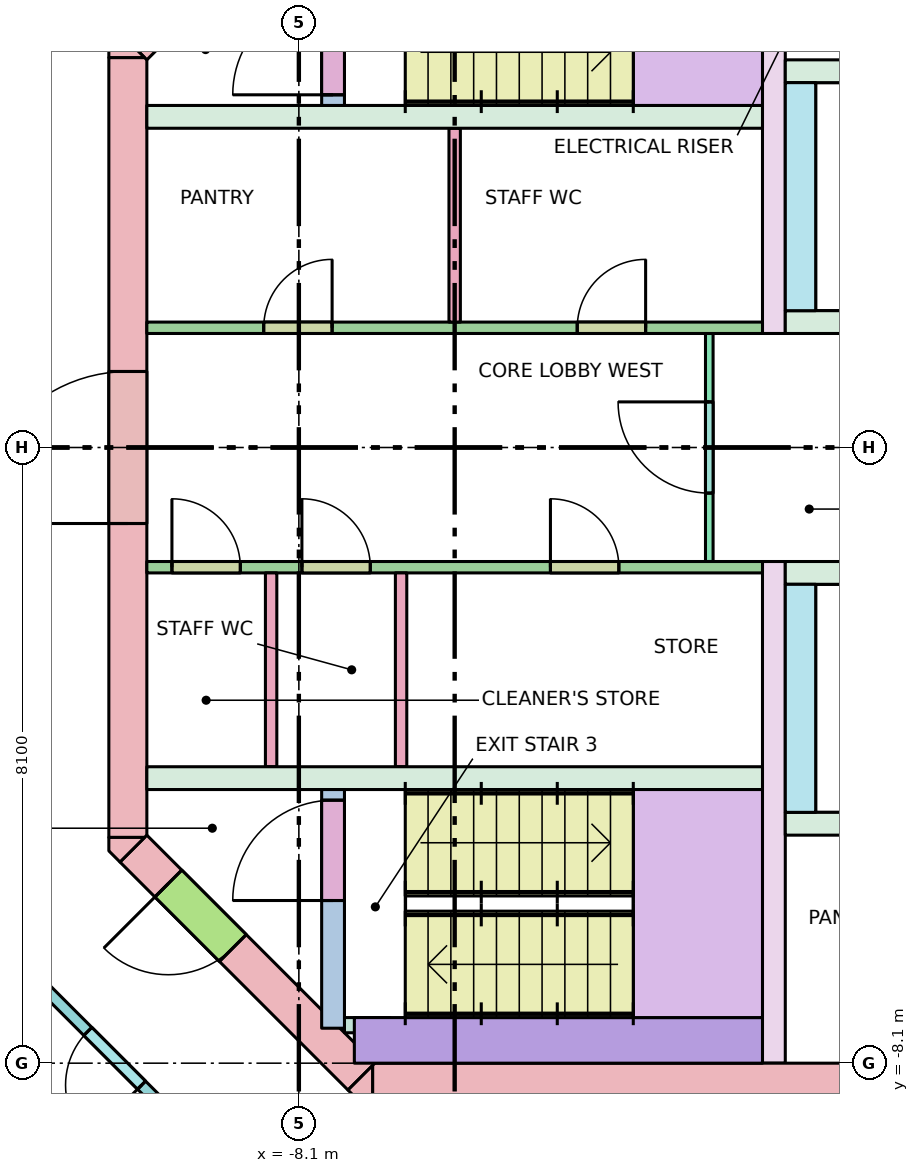
"""IFC4 building model, lengths in metres.
Left out: names, types, materials, properties, quantities, classifications, styles, units other than length and angle.
Written with IfcOpenShell. Run it as: python <this file> out.ifc"""

import sys

from ifc_helpers import new_model, si_unit, direction, frame, frame_2d, origin, place, context, subcontext, project, spatial, polyline, rectangle, outline, extrude, element, fill, save


model = new_model("IFC4")
c1 = context("Model", 3, precision=1e-05, world=origin(), true_north=direction((0.0, 1.0)))
c2 = subcontext(c1, "Body", "Model", "MODEL_VIEW")
j1 = project(units=[si_unit("LENGTHUNIT", "METRE"), si_unit("PLANEANGLEUNIT", "RADIAN")], contexts=[c1])
p1 = place(None, origin())
s1 = spatial("IfcSite", under=j1, at=p1, CompositionType="ELEMENT")
p2 = place(p1, origin())
s2 = spatial("IfcBuilding", under=s1, at=p2, CompositionType="ELEMENT")
p3 = place(p2, frame((0.0, 0.0, 287.1)))
s3 = spatial("IfcBuildingStorey", under=s2, at=p3, CompositionType="ELEMENT", Elevation=287.1)
p4 = place(p3, frame((-7.13, -8.35, -0.28), z_axis=(0.0, 0.0, 1.0), x_axis=(1.0, 0.0, 0.0)))
e1 = element("IfcWall", 1, at=p4, inside=s3, PredefinedType="SHEAR", context=c2, shape_type="SweptSolid", body=[
    extrude(rectangle(XDim=14.26, YDim=0.5, at=frame_2d((7.13, 0.0))), origin(), (0.0, 0.0, 1.0), 3.7),
])
p5 = place(p4, frame((8.08, 0.0, 0.28)))
e2 = element("IfcOpeningElement", 2, at=p5, cuts=e1, PredefinedType="OPENING", context=c2, shape_type="SweptSolid", body=[
    extrude(rectangle(XDim=0.7, YDim=2.1, at=frame_2d((0.35, 1.05))), frame((0.0, 0.26, 0.0), z_axis=(0.0, -1.0, 0.0), x_axis=(1.0, 0.0, 0.0)), (0.0, 0.0, 1.0), 0.52),
])
p6 = place(p4, frame((6.205, 0.0, 0.28)))
e3 = element("IfcOpeningElement", 3, at=p6, cuts=e1, PredefinedType="OPENING", context=c2, shape_type="SweptSolid", body=[
    extrude(rectangle(XDim=0.9, YDim=2.1, at=frame_2d((0.45, 1.05))), frame((0.0, 0.26, 0.0), z_axis=(0.0, -1.0, 0.0), x_axis=(1.0, 0.0, 0.0)), (0.0, 0.0, 1.0), 0.52),
])
p7 = place(p4, frame((10.667, 0.0, 0.28)))
e4 = element("IfcOpeningElement", 4, at=p7, cuts=e1, PredefinedType="OPENING", context=c2, shape_type="SweptSolid", body=[
    extrude(rectangle(XDim=0.9, YDim=2.1, at=frame_2d((0.45, 1.05))), frame((0.0, 0.26, 0.0), z_axis=(0.0, -1.0, 0.0), x_axis=(1.0, 0.0, 0.0)), (0.0, 0.0, 1.0), 0.52),
])
p8 = place(p3, frame((-10.35, -5.13, -0.28), z_axis=(0.0, 0.0, 1.0), x_axis=(0.0, 1.0, 0.0)))
e5 = element("IfcWall", 5, at=p8, inside=s3, PredefinedType="SHEAR", context=c2, shape_type="SweptSolid", body=[
    extrude(rectangle(XDim=10.26, YDim=0.5, at=frame_2d((5.13, 0.0))), origin(), (0.0, 0.0, 1.0), 3.7),
])
p9 = place(p8, frame((4.13, 0.0, 0.28)))
e6 = element("IfcOpeningElement", 6, at=p9, cuts=e5, PredefinedType="OPENING", context=c2, shape_type="SweptSolid", body=[
    extrude(rectangle(XDim=2.0, YDim=2.1, at=frame_2d((1.0, 1.05))), frame((0.0, 0.26, 0.0), z_axis=(0.0, -1.0, 0.0), x_axis=(1.0, 0.0, 0.0)), (0.0, 0.0, 1.0), 0.52),
])
p10 = place(p3, frame((-10.277, 5.277, -0.28), z_axis=(0.0, 0.0, 1.0), x_axis=(0.707106781187, 0.707106781187, 0.0)))
e7 = element("IfcWall", 7, at=p10, inside=s3, PredefinedType="SHEAR", context=c2, shape_type="SweptSolid", body=[
    extrude(rectangle(XDim=4.243, YDim=0.5, at=frame_2d((2.121, 0.0))), origin(), (0.0, 0.0, 1.0), 3.7),
])
p11 = place(p10, frame((0.65, 0.0, 0.28)))
e8 = element("IfcOpeningElement", 8, at=p11, cuts=e7, PredefinedType="OPENING", context=c2, shape_type="SweptSolid", body=[
    extrude(rectangle(XDim=1.2, YDim=2.1, at=frame_2d((0.6, 1.05))), frame((0.0, 0.26, 0.0), z_axis=(0.0, -1.0, 0.0), x_axis=(1.0, 0.0, 0.0)), (0.0, 0.0, 1.0), 0.52),
])
p12 = place(p3, frame((-7.277, -8.277, -0.28), z_axis=(0.0, 0.0, 1.0), x_axis=(-0.707106781187, 0.707106781187, 0.0)))
e9 = element("IfcWall", 9, at=p12, inside=s3, PredefinedType="SHEAR", context=c2, shape_type="SweptSolid", body=[
    extrude(rectangle(XDim=4.243, YDim=0.5, at=frame_2d((2.121, 0.0))), origin(), (0.0, 0.0, 1.0), 3.7),
])
p13 = place(p12, frame((2.393, 0.0, 0.28)))
e10 = element("IfcOpeningElement", 10, at=p13, cuts=e9, PredefinedType="OPENING", context=c2, shape_type="SweptSolid", body=[
    extrude(rectangle(XDim=1.2, YDim=2.1, at=frame_2d((0.6, 1.05))), frame((0.0, 0.26, 0.0), z_axis=(0.0, -1.0, 0.0), x_axis=(1.0, 0.0, 0.0)), (0.0, 0.0, 1.0), 0.52),
])
p14 = place(p3, frame((0.0, 0.0, -0.28)))
e11 = element("IfcWall", 11, at=p14, inside=s3, PredefinedType="SHEAR", context=c2, shape_type="SweptSolid", body=[
    extrude(outline(polyline([(-7.307, -8.6), (-7.454, -8.454), (-7.13, -8.13), (-7.13, -8.6), (-7.307, -8.6)])), origin(), (0.0, 0.0, 1.0), 3.7),
])
p15 = place(p3, frame((0.0, 0.0, -0.28)))
e12 = element("IfcWall", 12, at=p15, inside=s3, PredefinedType="SHEAR", context=c2, shape_type="SweptSolid", body=[
    extrude(outline(polyline([(-10.6, -5.307), (-10.6, -5.13), (-10.13, -5.13), (-10.454, -5.454), (-10.6, -5.307)])), origin(), (0.0, 0.0, 1.0), 3.7),
])
p16 = place(p3, frame((0.0, 0.0, -0.28)))
e13 = element("IfcWall", 13, at=p16, inside=s3, PredefinedType="SHEAR", context=c2, shape_type="SweptSolid", body=[
    extrude(outline(polyline([(-10.454, 5.454), (-10.13, 5.13), (-10.6, 5.13), (-10.6, 5.307), (-10.454, 5.454)])), origin(), (0.0, 0.0, 1.0), 3.7),
])
for number, where, z_axis, x_axis in (
    (14, (-10.1, 4.35, 0.0), (0.0, 0.0, 1.0), (1.0, 0.0, 0.0)),
    (15, (-10.1, -4.35, 0.0), (0.0, 0.0, 1.0), (1.0, 0.0, 0.0)),
):
    element("IfcWall", number, at=place(p3, frame(where, z_axis=z_axis, x_axis=x_axis)), inside=s3, PredefinedType="SOLIDWALL", context=c2, shape_type="SweptSolid", body=[
        extrude(rectangle(XDim=8.1, YDim=0.3, at=frame_2d((4.05, 0.0))), origin(), (0.0, 0.0, 1.0), 3.42),
    ])
for number, where, z_axis, x_axis in (
    (16, (-1.85, 1.5, 0.0), (0.0, 0.0, 1.0), (0.0, 1.0, 0.0)),
    (17, (-1.85, -8.1, 0.0), (0.0, 0.0, 1.0), (0.0, 1.0, 0.0)),
):
    element("IfcWall", number, at=place(p3, frame(where, z_axis=z_axis, x_axis=x_axis)), inside=s3, PredefinedType="SHEAR", context=c2, shape_type="SweptSolid", body=[
        extrude(rectangle(XDim=6.6, YDim=0.3, at=frame_2d((3.3, 0.0))), origin(), (0.0, 0.0, 1.0), 3.42),
    ])
p17 = place(p3, frame((-1.7, 1.65, 0.0), z_axis=(0.0, 0.0, 1.0), x_axis=(1.0, 0.0, 0.0)))
e18 = element("IfcWall", 18, at=p17, inside=s3, PredefinedType="SOLIDWALL", context=c2, shape_type="SweptSolid", body=[
    extrude(rectangle(XDim=3.4, YDim=0.3, at=frame_2d((1.7, 0.0))), origin(), (0.0, 0.0, 1.0), 3.42),
])
p18 = place(p17, frame((1.15, 0.0, 0.0)))
e19 = element("IfcOpeningElement", 19, at=p18, cuts=e18, PredefinedType="OPENING", context=c2, shape_type="SweptSolid", body=[
    extrude(rectangle(XDim=1.1, YDim=2.1, at=frame_2d((0.55, 1.05))), frame((0.0, 0.16, 0.0), z_axis=(0.0, -1.0, 0.0), x_axis=(1.0, 0.0, 0.0)), (0.0, 0.0, 1.0), 0.32),
])
p19 = place(p3, frame((-1.7, -1.65, 0.0), z_axis=(0.0, 0.0, 1.0), x_axis=(1.0, 0.0, 0.0)))
e20 = element("IfcWall", 20, at=p19, inside=s3, PredefinedType="SOLIDWALL", context=c2, shape_type="SweptSolid", body=[
    extrude(rectangle(XDim=3.4, YDim=0.3, at=frame_2d((1.7, 0.0))), origin(), (0.0, 0.0, 1.0), 3.42),
])
p20 = place(p19, frame((1.15, 0.0, 0.0)))
e21 = element("IfcOpeningElement", 21, at=p20, cuts=e20, PredefinedType="OPENING", context=c2, shape_type="SweptSolid", body=[
    extrude(rectangle(XDim=1.1, YDim=2.1, at=frame_2d((0.55, 1.05))), frame((0.0, 0.16, 0.0), z_axis=(0.0, -1.0, 0.0), x_axis=(1.0, 0.0, 0.0)), (0.0, 0.0, 1.0), 0.32),
])
for number, where, z_axis, x_axis in (
    (22, (-1.5, 1.8, 0.0), (0.0, 0.0, 1.0), (0.0, 1.0, 0.0)),
    (23, (-1.5, -4.8, 0.0), (0.0, 0.0, 1.0), (0.0, 1.0, 0.0)),
):
    element("IfcWall", number, at=place(p3, frame(where, z_axis=z_axis, x_axis=x_axis)), inside=s3, PredefinedType="SOLIDWALL", context=c2, shape_type="SweptSolid", body=[
        extrude(rectangle(XDim=3.0, YDim=0.4, at=frame_2d((1.5, 0.0))), origin(), (0.0, 0.0, 1.0), 3.42),
    ])
for number, where, z_axis, x_axis in (
    (24, (-1.7, 4.95, 0.0), (0.0, 0.0, 1.0), (1.0, 0.0, 0.0)),
    (25, (-1.7, -4.95, 0.0), (0.0, 0.0, 1.0), (1.0, 0.0, 0.0)),
):
    element("IfcWall", number, at=place(p3, frame(where, z_axis=z_axis, x_axis=x_axis)), inside=s3, PredefinedType="SOLIDWALL", context=c2, shape_type="SweptSolid", body=[
        extrude(rectangle(XDim=3.4, YDim=0.3, at=frame_2d((1.7, 0.0))), origin(), (0.0, 0.0, 1.0), 3.42),
    ])
p21 = place(p3, frame((-7.65, 4.5, 0.0), z_axis=(0.0, 0.0, 1.0), x_axis=(0.0, 1.0, 0.0)))
e26 = element("IfcWall", 26, at=p21, inside=s3, PredefinedType="SHEAR", context=c2, shape_type="SweptSolid", body=[
    extrude(rectangle(XDim=3.14, YDim=0.3, at=frame_2d((1.57, 0.0))), origin(), (0.0, 0.0, 1.0), 3.42),
])
p22 = place(p21, frame((0.14, 0.0, 0.0)))
e27 = element("IfcOpeningElement", 27, at=p22, cuts=e26, PredefinedType="OPENING", context=c2, shape_type="SweptSolid", body=[
    extrude(rectangle(XDim=1.32, YDim=2.1, at=frame_2d((0.66, 1.05))), frame((0.0, 0.16, 0.0), z_axis=(0.0, -1.0, 0.0), x_axis=(1.0, 0.0, 0.0)), (0.0, 0.0, 1.0), 0.32),
])
p23 = place(p3, frame((-7.65, -7.64, 0.0), z_axis=(0.0, 0.0, 1.0), x_axis=(0.0, 1.0, 0.0)))
e28 = element("IfcWall", 28, at=p23, inside=s3, PredefinedType="SHEAR", context=c2, shape_type="SweptSolid", body=[
    extrude(rectangle(XDim=3.14, YDim=0.3, at=frame_2d((1.57, 0.0))), origin(), (0.0, 0.0, 1.0), 3.42),
])
p24 = place(p23, frame((1.68, 0.0, 0.0)))
e29 = element("IfcOpeningElement", 29, at=p24, cuts=e28, PredefinedType="OPENING", context=c2, shape_type="SweptSolid", body=[
    extrude(rectangle(XDim=1.32, YDim=2.1, at=frame_2d((0.66, 1.05))), frame((0.0, 0.16, 0.0), z_axis=(0.0, -1.0, 0.0), x_axis=(1.0, 0.0, 0.0)), (0.0, 0.0, 1.0), 0.32),
])
p25 = place(p3, frame((-7.5, -7.6, 0.0), z_axis=(0.0, 0.0, 1.0), x_axis=(1.0, 0.0, 0.0)))
e30 = element("IfcWall", 30, at=p25, inside=s3, PredefinedType="SHEAR", context=c2, shape_type="SweptSolid", body=[
    extrude(rectangle(XDim=0.6, YDim=0.2, at=frame_2d((0.3, 0.0))), origin(), (0.0, 0.0, 1.0), 3.42),
])
p26 = place(p3, frame((-7.37, -7.8, 0.0), z_axis=(0.0, 0.0, 1.0), x_axis=(1.0, 0.0, 0.0)))
e31 = element("IfcWall", 31, at=p26, inside=s3, PredefinedType="SHEAR", context=c2, shape_type="SweptSolid", body=[
    extrude(rectangle(XDim=5.37, YDim=0.6, at=frame_2d((2.685, 0.0))), origin(), (0.0, 0.0, 1.0), 3.42),
])
p27 = place(p3, frame((-2.7, -1.5, 0.0), z_axis=(0.0, 0.0, 1.0), x_axis=(0.0, 1.0, 0.0)))
e32 = element("IfcWall", 32, at=p27, inside=s3, PredefinedType="PARTITIONING", context=c2, shape_type="SweptSolid", body=[
    extrude(rectangle(XDim=3.0, YDim=0.1, at=frame_2d((1.5, 0.0))), origin(), (0.0, 0.0, 1.0), 3.42),
])
p28 = place(p27, frame((0.9, 0.0, 0.0)))
e33 = element("IfcOpeningElement", 33, at=p28, cuts=e32, PredefinedType="OPENING", context=c2, shape_type="SweptSolid", body=[
    extrude(rectangle(XDim=1.2, YDim=2.1, at=frame_2d((0.6, 1.05))), frame((0.0, 0.06, 0.0), z_axis=(0.0, -1.0, 0.0), x_axis=(1.0, 0.0, 0.0)), (0.0, 0.0, 1.0), 0.12),
])
for number, where, z_axis, x_axis in (
    (34, (-6.05, 1.65, 0.0), (0.0, 0.0, 1.0), (0.0, 1.0, 0.0)),
    (35, (-8.465, -4.2, 0.0), (0.0, 0.0, 1.0), (0.0, 1.0, 0.0)),
    (36, (-6.755, -4.2, 0.0), (0.0, 0.0, 1.0), (0.0, 1.0, 0.0)),
):
    element("IfcWall", number, at=place(p3, frame(where, z_axis=z_axis, x_axis=x_axis)), inside=s3, PredefinedType="PARTITIONING", context=c2, shape_type="SweptSolid", body=[
        extrude(rectangle(XDim=2.55, YDim=0.15, at=frame_2d((1.275, 0.0))), origin(), (0.0, 0.0, 1.0), 3.42),
    ])
p29 = place(p3, frame((-10.1, 1.575, 0.0), z_axis=(0.0, 0.0, 1.0), x_axis=(1.0, 0.0, 0.0)))
e37 = element("IfcWall", 37, at=p29, inside=s3, PredefinedType="PARTITIONING", context=c2, shape_type="SweptSolid", body=[
    extrude(rectangle(XDim=8.1, YDim=0.15, at=frame_2d((4.05, 0.0))), origin(), (0.0, 0.0, 1.0), 3.42),
])
p30 = place(p29, frame((1.538, 0.0, 0.0)))
e38 = element("IfcOpeningElement", 38, at=p30, cuts=e37, PredefinedType="OPENING", context=c2, shape_type="SweptSolid", body=[
    extrude(rectangle(XDim=0.9, YDim=2.1, at=frame_2d((0.45, 1.05))), frame((0.0, 0.085, 0.0), z_axis=(0.0, -1.0, 0.0), x_axis=(1.0, 0.0, 0.0)), (0.0, 0.0, 1.0), 0.17),
])
p31 = place(p29, frame((5.663, 0.0, 0.0)))
e39 = element("IfcOpeningElement", 39, at=p31, cuts=e37, PredefinedType="OPENING", context=c2, shape_type="SweptSolid", body=[
    extrude(rectangle(XDim=0.9, YDim=2.1, at=frame_2d((0.45, 1.05))), frame((0.0, 0.085, 0.0), z_axis=(0.0, -1.0, 0.0), x_axis=(1.0, 0.0, 0.0)), (0.0, 0.0, 1.0), 0.17),
])
p32 = place(p3, frame((-10.1, -1.575, 0.0), z_axis=(0.0, 0.0, 1.0), x_axis=(1.0, 0.0, 0.0)))
e40 = element("IfcWall", 40, at=p32, inside=s3, PredefinedType="PARTITIONING", context=c2, shape_type="SweptSolid", body=[
    extrude(rectangle(XDim=8.1, YDim=0.15, at=frame_2d((4.05, 0.0))), origin(), (0.0, 0.0, 1.0), 3.42),
])
p33 = place(p32, frame((0.33, 0.0, 0.0)))
e41 = element("IfcOpeningElement", 41, at=p33, cuts=e40, PredefinedType="OPENING", context=c2, shape_type="SweptSolid", body=[
    extrude(rectangle(XDim=0.9, YDim=2.1, at=frame_2d((0.45, 1.05))), frame((0.0, 0.085, 0.0), z_axis=(0.0, -1.0, 0.0), x_axis=(1.0, 0.0, 0.0)), (0.0, 0.0, 1.0), 0.17),
])
p34 = place(p32, frame((2.04, 0.0, 0.0)))
e42 = element("IfcOpeningElement", 42, at=p34, cuts=e40, PredefinedType="OPENING", context=c2, shape_type="SweptSolid", body=[
    extrude(rectangle(XDim=0.9, YDim=2.1, at=frame_2d((0.45, 1.05))), frame((0.0, 0.085, 0.0), z_axis=(0.0, -1.0, 0.0), x_axis=(1.0, 0.0, 0.0)), (0.0, 0.0, 1.0), 0.17),
])
p35 = place(p32, frame((5.31, 0.0, 0.0)))
e43 = element("IfcOpeningElement", 43, at=p35, cuts=e40, PredefinedType="OPENING", context=c2, shape_type="SweptSolid", body=[
    extrude(rectangle(XDim=0.9, YDim=2.1, at=frame_2d((0.45, 1.05))), frame((0.0, 0.085, 0.0), z_axis=(0.0, -1.0, 0.0), x_axis=(1.0, 0.0, 0.0)), (0.0, 0.0, 1.0), 0.17),
])
p36 = place(p3, frame((-8.121, -10.438, 0.0), z_axis=(0.0, 0.0, 1.0), x_axis=(-0.707106781187, 0.707106781187, 0.0)))
e44 = element("IfcWall", 44, at=p36, inside=s3, PredefinedType="PARTITIONING", context=c2, shape_type="SweptSolid", body=[
    extrude(rectangle(XDim=6.105, YDim=0.15, at=frame_2d((3.053, 0.0))), origin(), (0.0, 0.0, 1.0), 2.57),
])
p37 = place(p36, frame((2.897, 0.0, 0.0)))
e45 = element("IfcOpeningElement", 45, at=p37, cuts=e44, PredefinedType="OPENING", context=c2, shape_type="SweptSolid", body=[
    extrude(rectangle(XDim=1.0, YDim=2.1, at=frame_2d((0.5, 1.05))), frame((0.0, 0.085, 0.0), z_axis=(0.0, -1.0, 0.0), x_axis=(1.0, 0.0, 0.0)), (0.0, 0.0, 1.0), 0.17),
])
p38 = place(p36, frame((0.394, 0.0, 0.0)))
e46 = element("IfcOpeningElement", 46, at=p38, cuts=e44, PredefinedType="OPENING", context=c2, shape_type="SweptSolid", body=[
    extrude(rectangle(XDim=0.9, YDim=2.1, at=frame_2d((0.45, 1.05))), frame((0.0, 0.085, 0.0), z_axis=(0.0, -1.0, 0.0), x_axis=(1.0, 0.0, 0.0)), (0.0, 0.0, 1.0), 0.17),
])
p39 = place(p22, origin())
e47 = element("IfcDoor", 47, at=p39, inside=s3, OperationType="DOUBLE_DOOR_SINGLE_SWING", PredefinedType="DOOR", context=c2, shape_type="SweptSolid", body=[
    extrude(rectangle(XDim=1.32, YDim=2.1, at=frame_2d((0.66, 1.05))), frame((0.0, 0.025, 0.0), z_axis=(0.0, -1.0, 0.0), x_axis=(1.0, 0.0, 0.0)), (0.0, 0.0, 1.0), 0.05),
])
fill(e27, e47)
p40 = place(p24, origin())
e48 = element("IfcDoor", 48, at=p40, inside=s3, OperationType="DOUBLE_DOOR_SINGLE_SWING", PredefinedType="DOOR", context=c2, shape_type="SweptSolid", body=[
    extrude(rectangle(XDim=1.32, YDim=2.1, at=frame_2d((0.66, 1.05))), frame((0.0, 0.025, 0.0), z_axis=(0.0, -1.0, 0.0), x_axis=(1.0, 0.0, 0.0)), (0.0, 0.0, 1.0), 0.05),
])
fill(e29, e48)
p41 = place(p13, origin())
e49 = element("IfcDoor", 49, at=p41, inside=s3, OperationType="SINGLE_SWING_RIGHT", PredefinedType="DOOR", context=c2, shape_type="SweptSolid", body=[
    extrude(rectangle(XDim=1.2, YDim=2.1, at=frame_2d((0.6, 1.05))), frame((0.0, 0.025, 0.0), z_axis=(0.0, -1.0, 0.0), x_axis=(1.0, 0.0, 0.0)), (0.0, 0.0, 1.0), 0.05),
])
fill(e10, e49)
p42 = place(p9, origin())
e50 = element("IfcDoor", 50, at=p42, inside=s3, OperationType="DOUBLE_DOOR_SINGLE_SWING", PredefinedType="DOOR", context=c2, shape_type="SweptSolid", body=[
    extrude(rectangle(XDim=2.0, YDim=2.1, at=frame_2d((1.0, 1.05))), frame((0.0, 0.025, 0.0), z_axis=(0.0, -1.0, 0.0), x_axis=(1.0, 0.0, 0.0)), (0.0, 0.0, 1.0), 0.05),
])
fill(e6, e50)
p43 = place(p28, origin())
e51 = element("IfcDoor", 51, at=p43, inside=s3, OperationType="SINGLE_SWING_RIGHT", PredefinedType="DOOR", context=c2, shape_type="SweptSolid", body=[
    extrude(rectangle(XDim=1.2, YDim=2.1, at=frame_2d((0.6, 1.05))), frame((0.0, 0.025, 0.0), z_axis=(0.0, -1.0, 0.0), x_axis=(1.0, 0.0, 0.0)), (0.0, 0.0, 1.0), 0.05),
])
fill(e33, e51)
p44 = place(p30, origin())
e52 = element("IfcDoor", 52, at=p44, inside=s3, OperationType="SINGLE_SWING_RIGHT", PredefinedType="DOOR", context=c2, shape_type="SweptSolid", body=[
    extrude(rectangle(XDim=0.9, YDim=2.1, at=frame_2d((0.45, 1.05))), frame((0.0, 0.025, 0.0), z_axis=(0.0, -1.0, 0.0), x_axis=(1.0, 0.0, 0.0)), (0.0, 0.0, 1.0), 0.05),
])
fill(e38, e52)
p45 = place(p31, origin())
e53 = element("IfcDoor", 53, at=p45, inside=s3, OperationType="SINGLE_SWING_RIGHT", PredefinedType="DOOR", context=c2, shape_type="SweptSolid", body=[
    extrude(rectangle(XDim=0.9, YDim=2.1, at=frame_2d((0.45, 1.05))), frame((0.0, 0.025, 0.0), z_axis=(0.0, -1.0, 0.0), x_axis=(1.0, 0.0, 0.0)), (0.0, 0.0, 1.0), 0.05),
])
fill(e39, e53)
p46 = place(p33, origin())
e54 = element("IfcDoor", 54, at=p46, inside=s3, OperationType="SINGLE_SWING_LEFT", PredefinedType="DOOR", context=c2, shape_type="SweptSolid", body=[
    extrude(rectangle(XDim=0.9, YDim=2.1, at=frame_2d((0.45, 1.05))), frame((0.0, 0.025, 0.0), z_axis=(0.0, -1.0, 0.0), x_axis=(1.0, 0.0, 0.0)), (0.0, 0.0, 1.0), 0.05),
])
fill(e41, e54)
p47 = place(p34, origin())
e55 = element("IfcDoor", 55, at=p47, inside=s3, OperationType="SINGLE_SWING_LEFT", PredefinedType="DOOR", context=c2, shape_type="SweptSolid", body=[
    extrude(rectangle(XDim=0.9, YDim=2.1, at=frame_2d((0.45, 1.05))), frame((0.0, 0.025, 0.0), z_axis=(0.0, -1.0, 0.0), x_axis=(1.0, 0.0, 0.0)), (0.0, 0.0, 1.0), 0.05),
])
fill(e42, e55)
p48 = place(p35, origin())
e56 = element("IfcDoor", 56, at=p48, inside=s3, OperationType="SINGLE_SWING_LEFT", PredefinedType="DOOR", context=c2, shape_type="SweptSolid", body=[
    extrude(rectangle(XDim=0.9, YDim=2.1, at=frame_2d((0.45, 1.05))), frame((0.0, 0.025, 0.0), z_axis=(0.0, -1.0, 0.0), x_axis=(1.0, 0.0, 0.0)), (0.0, 0.0, 1.0), 0.05),
])
fill(e43, e56)
p49 = place(p37, origin())
e57 = element("IfcDoor", 57, at=p49, inside=s3, OperationType="SINGLE_SWING_LEFT", PredefinedType="DOOR", context=c2, shape_type="SweptSolid", body=[
    extrude(rectangle(XDim=1.0, YDim=2.1, at=frame_2d((0.5, 1.05))), frame((0.0, 0.025, 0.0), z_axis=(0.0, -1.0, 0.0), x_axis=(1.0, 0.0, 0.0)), (0.0, 0.0, 1.0), 0.05),
])
fill(e45, e57)
save(model, sys.argv[1])
